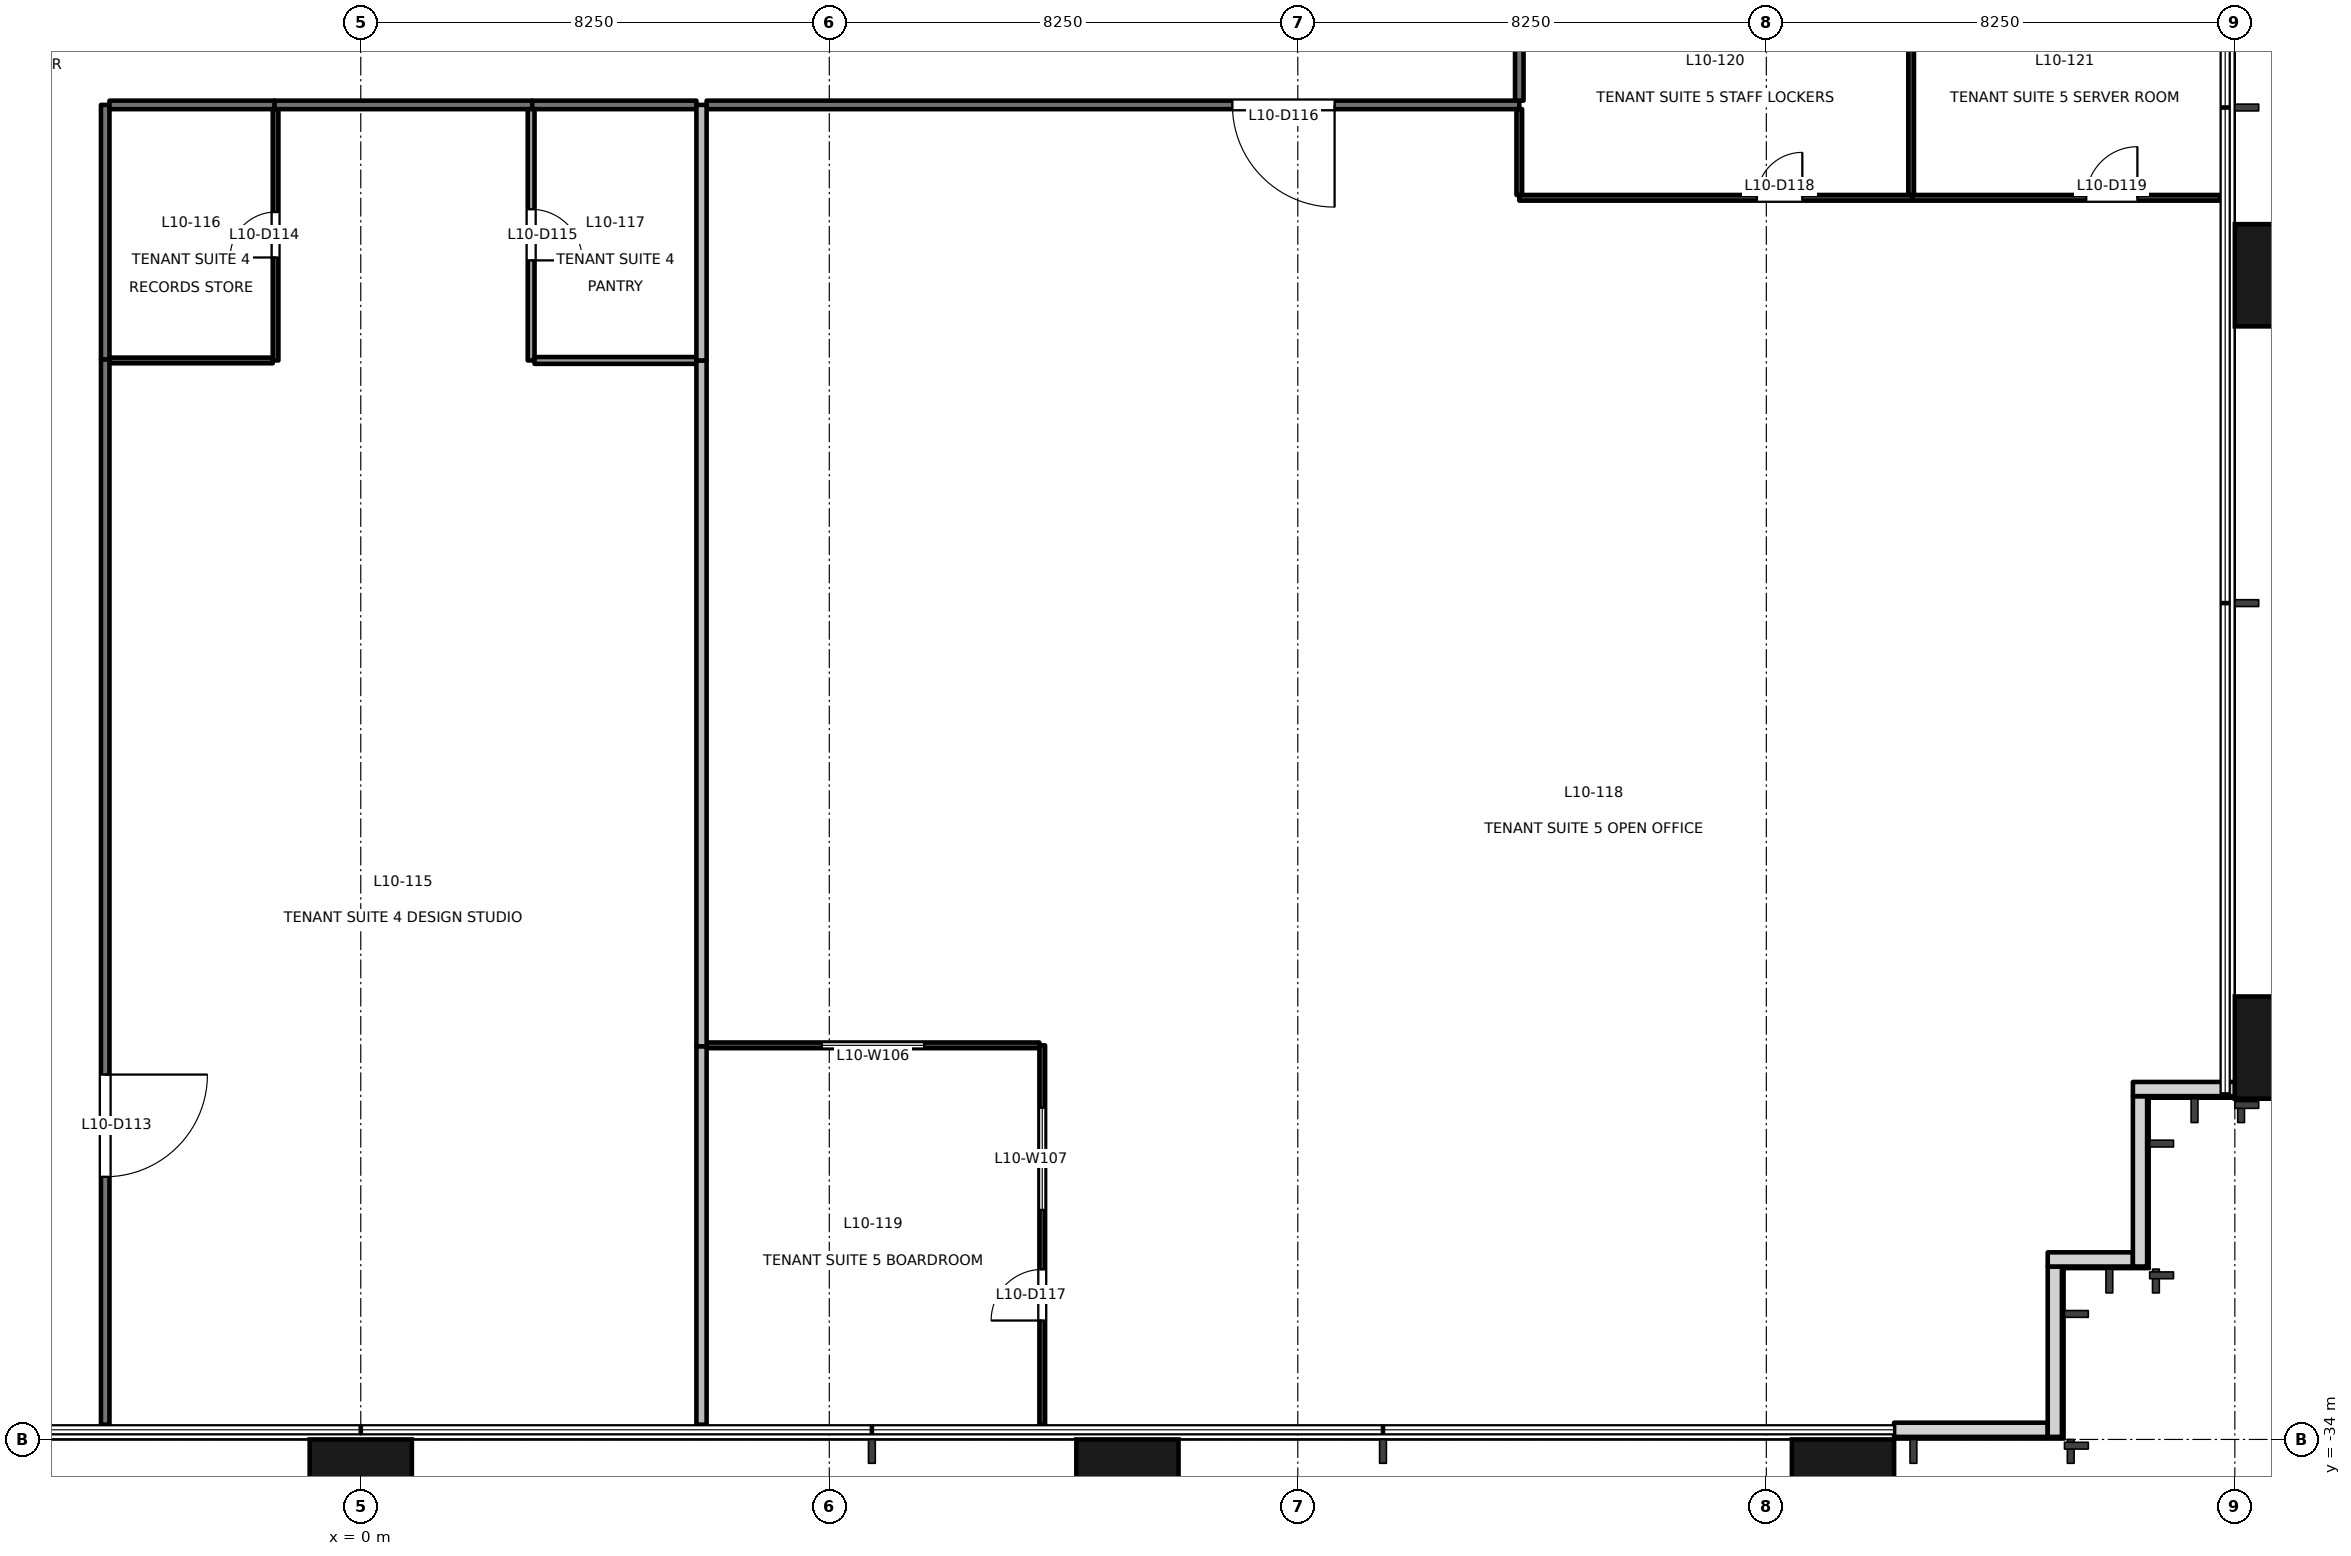
"""IFC4 building model, lengths in metres.
Left out: names, types, materials, properties, quantities, classifications, styles, units other than length and angle.
Written with IfcOpenShell. Run it as: python <this file> out.ifc"""

import sys

from ifc_helpers import new_model, si_unit, direction, frame, frame_2d, origin, origin_2d, place, context, subcontext, project, spatial, rectangle, extrude, element, fill, save


model = new_model("IFC4")
c1 = context("Model", 3, precision=1e-05, world=origin(), true_north=direction((0.0, 1.0)))
c2 = subcontext(c1, "Body", "Model", "MODEL_VIEW")
j1 = project(units=[si_unit("LENGTHUNIT", "METRE"), si_unit("PLANEANGLEUNIT", "RADIAN")], contexts=[c1])
p1 = place(None, origin())
s1 = spatial("IfcSite", under=j1, at=p1, CompositionType="ELEMENT")
p2 = place(p1, origin())
s2 = spatial("IfcBuilding", under=s1, at=p2, CompositionType="ELEMENT")
p3 = place(p2, frame((0.0, 0.0, 48.8)))
s3 = spatial("IfcBuildingStorey", under=s2, at=p3, CompositionType="ELEMENT", Elevation=48.8)
for number, where, z_axis, x_axis in (
    (1, (0.0, -34.9, -0.2), (0.0, 0.0, 1.0), (1.0, 0.0, 0.0)),
    (2, (13.5, -34.9, -0.2), (0.0, 0.0, 1.0), (1.0, 0.0, 0.0)),
    (3, (26.1, -34.9, -0.2), (0.0, 0.0, 1.0), (1.0, 0.0, 0.0)),
    (4, (33.9, -27.1, -0.2), (0.0, 0.0, 1.0), (0.0, 1.0, 0.0)),
    (5, (33.9, -13.5, -0.2), (0.0, 0.0, 1.0), (0.0, 1.0, 0.0)),
):
    element("IfcColumn", number, at=place(p3, frame(where, z_axis=z_axis, x_axis=x_axis)), inside=s3, PredefinedType="COLUMN", context=c2, shape_type="SweptSolid", body=[
        extrude(rectangle(XDim=1.8, YDim=1.8, at=origin_2d()), origin(), (0.0, 0.0, 1.0), 4.1),
    ])
p4 = place(p3, frame((27.0, -33.83, 0.0), z_axis=(0.0, 0.0, 1.0), x_axis=(1.0, 0.0, 0.0)))
e6 = element("IfcWall", 6, at=p4, inside=s3, PredefinedType="SOLIDWALL", context=c2, shape_type="SweptSolid", body=[
    extrude(rectangle(XDim=2.705, YDim=0.25, at=frame_2d((1.353, 0.0))), origin(), (0.0, 0.0, 1.0), 3.9),
])
p5 = place(p3, frame((29.83, -33.955, 0.0), z_axis=(0.0, 0.0, 1.0), x_axis=(0.0, 1.0, 0.0)))
e7 = element("IfcWall", 7, at=p5, inside=s3, PredefinedType="SOLIDWALL", context=c2, shape_type="SweptSolid", body=[
    extrude(rectangle(XDim=3.0, YDim=0.25, at=frame_2d((1.5, 0.0))), origin(), (0.0, 0.0, 1.0), 3.9),
])
p6 = place(p3, frame((29.705, -30.83, 0.0), z_axis=(0.0, 0.0, 1.0), x_axis=(1.0, 0.0, 0.0)))
e8 = element("IfcWall", 8, at=p6, inside=s3, PredefinedType="SOLIDWALL", context=c2, shape_type="SweptSolid", body=[
    extrude(rectangle(XDim=1.5, YDim=0.25, at=frame_2d((0.75, 0.0))), origin(), (0.0, 0.0, 1.0), 3.9),
])
p7 = place(p3, frame((31.33, -30.955, 0.0), z_axis=(0.0, 0.0, 1.0), x_axis=(0.0, 1.0, 0.0)))
e9 = element("IfcWall", 9, at=p7, inside=s3, PredefinedType="SOLIDWALL", context=c2, shape_type="SweptSolid", body=[
    extrude(rectangle(XDim=3.0, YDim=0.25, at=frame_2d((1.5, 0.0))), origin(), (0.0, 0.0, 1.0), 3.9),
])
p8 = place(p3, frame((31.205, -27.83, 0.0), z_axis=(0.0, 0.0, 1.0), x_axis=(1.0, 0.0, 0.0)))
e10 = element("IfcWall", 10, at=p8, inside=s3, PredefinedType="SOLIDWALL", context=c2, shape_type="SweptSolid", body=[
    extrude(rectangle(XDim=1.8, YDim=0.25, at=frame_2d((0.9, 0.0))), origin(), (0.0, 0.0, 1.0), 3.9),
])
p9 = place(p3, frame((-4.5, -14.98, 0.0), z_axis=(0.0, 0.0, 1.0), x_axis=(0.0, -1.0, 0.0)))
e11 = element("IfcWall", 11, at=p9, inside=s3, PredefinedType="PARTITIONING", context=c2, shape_type="SweptSolid", body=[
    extrude(rectangle(XDim=18.76, YDim=0.15, at=frame_2d((9.38, 0.0))), origin(), (0.0, 0.0, 1.0), 2.9),
])
p10 = place(p9, frame((12.595, 0.0, 0.0)))
e12 = element("IfcOpeningElement", 12, at=p10, cuts=e11, PredefinedType="OPENING", context=c2, shape_type="SweptSolid", body=[
    extrude(rectangle(XDim=1.8, YDim=2.1, at=frame_2d((0.9, 1.05))), frame((0.0, 0.085, 0.0), z_axis=(0.0, -1.0, 0.0), x_axis=(1.0, 0.0, 0.0)), (0.0, 0.0, 1.0), 0.171),
])
p11 = place(p3, frame((3.02, -10.5, 0.0), z_axis=(0.0, 0.0, 1.0), x_axis=(-1.0, 0.0, 0.0)))
e13 = element("IfcWall", 13, at=p11, inside=s3, PredefinedType="PARTITIONING", context=c2, shape_type="SweptSolid", body=[
    extrude(rectangle(XDim=4.54, YDim=0.15, at=frame_2d((2.27, 0.0))), origin(), (0.0, 0.0, 1.0), 2.9),
])
p12 = place(p3, frame((-4.5, -10.5, 0.0), z_axis=(0.0, 0.0, 1.0), x_axis=(0.0, -1.0, 0.0)))
e14 = element("IfcWall", 14, at=p12, inside=s3, PredefinedType="PARTITIONING", context=c2, shape_type="SweptSolid", body=[
    extrude(rectangle(XDim=4.48, YDim=0.15, at=frame_2d((2.24, 0.0))), origin(), (0.0, 0.0, 1.0), 2.9),
])
p13 = place(p3, frame((-1.52, -10.5, 0.0), z_axis=(0.0, 0.0, 1.0), x_axis=(-1.0, 0.0, 0.0)))
e15 = element("IfcWall", 15, at=p13, inside=s3, PredefinedType="PARTITIONING", context=c2, shape_type="SweptSolid", body=[
    extrude(rectangle(XDim=2.905, YDim=0.15, at=frame_2d((1.453, 0.0))), origin(), (0.0, 0.0, 1.0), 2.9),
])
p14 = place(p3, frame((5.91, -10.5, 0.0), z_axis=(0.0, 0.0, 1.0), x_axis=(-1.0, 0.0, 0.0)))
e16 = element("IfcWall", 16, at=p14, inside=s3, PredefinedType="PARTITIONING", context=c2, shape_type="SweptSolid", body=[
    extrude(rectangle(XDim=2.89, YDim=0.15, at=frame_2d((1.445, 0.0))), origin(), (0.0, 0.0, 1.0), 2.9),
])
p15 = place(p3, frame((20.4, -10.5, 0.0), z_axis=(0.0, 0.0, 1.0), x_axis=(-1.0, 0.0, 0.0)))
e17 = element("IfcWall", 17, at=p15, inside=s3, PredefinedType="PARTITIONING", context=c2, shape_type="SweptSolid", body=[
    extrude(rectangle(XDim=14.31, YDim=0.15, at=frame_2d((7.155, 0.0))), origin(), (0.0, 0.0, 1.0), 2.5),
])
p16 = place(p15, frame((3.252, 0.0, 0.0)))
e18 = element("IfcOpeningElement", 18, at=p16, cuts=e17, PredefinedType="OPENING", context=c2, shape_type="SweptSolid", body=[
    extrude(rectangle(XDim=1.8, YDim=2.1, at=frame_2d((0.9, 1.05))), frame((0.0, 0.085, 0.0), z_axis=(0.0, -1.0, 0.0), x_axis=(1.0, 0.0, 0.0)), (0.0, 0.0, 1.0), 0.171),
])
p17 = place(p3, frame((20.4, -7.726, 0.0), z_axis=(0.0, 0.0, 1.0), x_axis=(0.0, -1.0, 0.0)))
e19 = element("IfcWall", 19, at=p17, inside=s3, PredefinedType="PARTITIONING", context=c2, shape_type="SweptSolid", body=[
    extrude(rectangle(XDim=2.699, YDim=0.15, at=frame_2d((1.35, 0.0))), origin(), (0.0, 0.0, 1.0), 3.3),
])
p18 = place(p3, frame((-4.425, -15.0, 0.0), z_axis=(0.0, 0.0, 1.0), x_axis=(1.0, 0.0, 0.0)))
e20 = element("IfcWall", 20, at=p18, inside=s3, PredefinedType="PARTITIONING", context=c2, shape_type="SweptSolid", body=[
    extrude(rectangle(XDim=2.875, YDim=0.1, at=frame_2d((1.438, 0.0))), origin(), (0.0, 0.0, 1.0), 2.9),
])
p19 = place(p3, frame((-1.5, -15.0, 0.0), z_axis=(0.0, 0.0, 1.0), x_axis=(0.0, 1.0, 0.0)))
e21 = element("IfcWall", 21, at=p19, inside=s3, PredefinedType="PARTITIONING", context=c2, shape_type="SweptSolid", body=[
    extrude(rectangle(XDim=4.425, YDim=0.1, at=frame_2d((2.212, 0.0))), origin(), (0.0, 0.0, 1.0), 3.9),
])
p20 = place(p19, frame((1.813, 0.0, 0.0)))
e22 = element("IfcOpeningElement", 22, at=p20, cuts=e21, PredefinedType="OPENING", context=c2, shape_type="SweptSolid", body=[
    extrude(rectangle(XDim=0.8, YDim=2.1, at=frame_2d((0.4, 1.05))), frame((0.0, 0.061, 0.0), z_axis=(0.0, -1.0, 0.0), x_axis=(1.0, 0.0, 0.0)), (0.0, 0.0, 1.0), 0.121),
])
p21 = place(p3, frame((3.0, -10.575, 0.0), z_axis=(0.0, 0.0, 1.0), x_axis=(0.0, -1.0, 0.0)))
e23 = element("IfcWall", 23, at=p21, inside=s3, PredefinedType="PARTITIONING", context=c2, shape_type="SweptSolid", body=[
    extrude(rectangle(XDim=4.425, YDim=0.12, at=frame_2d((2.212, 0.0))), origin(), (0.0, 0.0, 1.0), 3.9),
])
p22 = place(p21, frame((1.763, 0.0, 0.0)))
e24 = element("IfcOpeningElement", 24, at=p22, cuts=e23, PredefinedType="OPENING", context=c2, shape_type="SweptSolid", body=[
    extrude(rectangle(XDim=0.9, YDim=2.1, at=frame_2d((0.45, 1.05))), frame((0.0, 0.071, 0.0), z_axis=(0.0, -1.0, 0.0), x_axis=(1.0, 0.0, 0.0)), (0.0, 0.0, 1.0), 0.141),
])
p23 = place(p3, frame((3.06, -15.0, 0.0), z_axis=(0.0, 0.0, 1.0), x_axis=(1.0, 0.0, 0.0)))
e25 = element("IfcWall", 25, at=p23, inside=s3, PredefinedType="PARTITIONING", context=c2, shape_type="SweptSolid", body=[
    extrude(rectangle(XDim=2.85, YDim=0.12, at=frame_2d((1.425, 0.0))), origin(), (0.0, 0.0, 1.0), 2.9),
])
p24 = place(p3, frame((6.0, -15.0, 0.0), z_axis=(0.0, 0.0, 1.0), x_axis=(0.0, -1.0, 0.0)))
e26 = element("IfcWall", 26, at=p24, inside=s3, PredefinedType="PARTITIONING", context=c2, shape_type="SweptSolid", body=[
    extrude(rectangle(XDim=12.08, YDim=0.18, at=frame_2d((6.04, 0.0))), origin(), (0.0, 0.0, 1.0), 3.9),
])
p25 = place(p3, frame((6.0, -27.08, 0.0), z_axis=(0.0, 0.0, 1.0), x_axis=(0.0, -1.0, 0.0)))
e27 = element("IfcWall", 27, at=p25, inside=s3, PredefinedType="PARTITIONING", context=c2, shape_type="SweptSolid", body=[
    extrude(rectangle(XDim=6.66, YDim=0.18, at=frame_2d((3.33, 0.0))), origin(), (0.0, 0.0, 1.0), 3.9),
])
p26 = place(p3, frame((6.0, -10.5, 0.0), z_axis=(0.0, 0.0, 1.0), x_axis=(0.0, -1.0, 0.0)))
e28 = element("IfcWall", 28, at=p26, inside=s3, PredefinedType="PARTITIONING", context=c2, shape_type="SweptSolid", body=[
    extrude(rectangle(XDim=4.5, YDim=0.18, at=frame_2d((2.25, 0.0))), origin(), (0.0, 0.0, 1.0), 3.9),
])
p27 = place(p3, frame((11.95, -27.06, 0.0), z_axis=(0.0, 0.0, 1.0), x_axis=(-1.0, 0.0, 0.0)))
e29 = element("IfcWall", 29, at=p27, inside=s3, PredefinedType="PARTITIONING", context=c2, shape_type="SweptSolid", body=[
    extrude(rectangle(XDim=5.86, YDim=0.1, at=frame_2d((2.93, 0.0))), origin(), (0.0, 0.0, 1.0), 2.9),
])
p28 = place(p27, frame((2.03, 0.0, 0.9)))
e30 = element("IfcOpeningElement", 30, at=p28, cuts=e29, PredefinedType="OPENING", context=c2, shape_type="SweptSolid", body=[
    extrude(rectangle(XDim=1.8, YDim=1.2, at=frame_2d((0.9, 0.6))), frame((0.0, 0.061, 0.0), z_axis=(0.0, -1.0, 0.0), x_axis=(1.0, 0.0, 0.0)), (0.0, 0.0, 1.0), 0.121),
])
p29 = place(p3, frame((12.0, -33.74, 0.0), z_axis=(0.0, 0.0, 1.0), x_axis=(0.0, 1.0, 0.0)))
e31 = element("IfcWall", 31, at=p29, inside=s3, PredefinedType="PARTITIONING", context=c2, shape_type="SweptSolid", body=[
    extrude(rectangle(XDim=6.68, YDim=0.1, at=frame_2d((3.34, 0.0))), origin(), (0.0, 0.0, 1.0), 3.9),
])
p30 = place(p29, frame((1.834, 0.0, 0.0)))
e32 = element("IfcOpeningElement", 32, at=p30, cuts=e31, PredefinedType="OPENING", context=c2, shape_type="SweptSolid", body=[
    extrude(rectangle(XDim=0.9, YDim=2.1, at=frame_2d((0.45, 1.05))), frame((0.0, 0.061, 0.0), z_axis=(0.0, -1.0, 0.0), x_axis=(1.0, 0.0, 0.0)), (0.0, 0.0, 1.0), 0.121),
])
p31 = place(p29, frame((3.782, 0.0, 0.9)))
e33 = element("IfcOpeningElement", 33, at=p31, cuts=e31, PredefinedType="OPENING", context=c2, shape_type="SweptSolid", body=[
    extrude(rectangle(XDim=1.8, YDim=1.2, at=frame_2d((0.9, 0.6))), frame((0.0, 0.061, 0.0), z_axis=(0.0, -1.0, 0.0), x_axis=(1.0, 0.0, 0.0)), (0.0, 0.0, 1.0), 0.121),
])
p32 = place(p3, frame((20.4, -12.136, 0.0), z_axis=(0.0, 0.0, 1.0), x_axis=(1.0, 0.0, 0.0)))
e34 = element("IfcWall", 34, at=p32, inside=s3, PredefinedType="PARTITIONING", context=c2, shape_type="SweptSolid", body=[
    extrude(rectangle(XDim=6.92, YDim=0.1, at=frame_2d((3.46, 0.0))), origin(), (0.0, 0.0, 1.0), 3.9),
])
p33 = place(p32, frame((4.184, 0.0, 0.0)))
e35 = element("IfcOpeningElement", 35, at=p33, cuts=e34, PredefinedType="OPENING", context=c2, shape_type="SweptSolid", body=[
    extrude(rectangle(XDim=0.8, YDim=2.1, at=frame_2d((0.4, 1.05))), frame((0.0, 0.061, 0.0), z_axis=(0.0, -1.0, 0.0), x_axis=(1.0, 0.0, 0.0)), (0.0, 0.0, 1.0), 0.121),
])
p34 = place(p3, frame((20.4, -10.575, 0.0), z_axis=(0.0, 0.0, 1.0), x_axis=(0.0, -1.0, 0.0)))
e36 = element("IfcWall", 36, at=p34, inside=s3, PredefinedType="PARTITIONING", context=c2, shape_type="SweptSolid", body=[
    extrude(rectangle(XDim=1.511, YDim=0.1, at=frame_2d((0.755, 0.0))), origin(), (0.0, 0.0, 1.0), 3.9),
])
p35 = place(p3, frame((27.32, -12.136, 0.0), z_axis=(0.0, 0.0, 1.0), x_axis=(1.0, 0.0, 0.0)))
e37 = element("IfcWall", 37, at=p35, inside=s3, PredefinedType="PARTITIONING", context=c2, shape_type="SweptSolid", body=[
    extrude(rectangle(XDim=5.42, YDim=0.1, at=frame_2d((2.71, 0.0))), origin(), (0.0, 0.0, 1.0), 3.9),
])
p36 = place(p35, frame((3.064, 0.0, 0.0)))
e38 = element("IfcOpeningElement", 38, at=p36, cuts=e37, PredefinedType="OPENING", context=c2, shape_type="SweptSolid", body=[
    extrude(rectangle(XDim=0.9, YDim=2.1, at=frame_2d((0.45, 1.05))), frame((0.0, 0.061, 0.0), z_axis=(0.0, -1.0, 0.0), x_axis=(1.0, 0.0, 0.0)), (0.0, 0.0, 1.0), 0.121),
])
p37 = place(p3, frame((27.3, -7.726, 0.0), z_axis=(0.0, 0.0, 1.0), x_axis=(0.0, -1.0, 0.0)))
e39 = element("IfcWall", 39, at=p37, inside=s3, PredefinedType="PARTITIONING", context=c2, shape_type="SweptSolid", body=[
    extrude(rectangle(XDim=4.36, YDim=0.1, at=frame_2d((2.18, 0.0))), origin(), (0.0, 0.0, 1.0), 3.3),
])
p38 = place(p10, origin())
e40 = element("IfcDoor", 40, at=p38, inside=s3, OperationType="DOUBLE_DOOR_SINGLE_SWING", PredefinedType="DOOR", context=c2, shape_type="SweptSolid", body=[
    extrude(rectangle(XDim=1.8, YDim=2.1, at=frame_2d((0.9, 1.05))), frame((0.0, 0.025, 0.0), z_axis=(0.0, -1.0, 0.0), x_axis=(1.0, 0.0, 0.0)), (0.0, 0.0, 1.0), 0.05),
])
fill(e12, e40)
p39 = place(p20, origin())
e41 = element("IfcDoor", 41, at=p39, inside=s3, OperationType="SINGLE_SWING_LEFT", PredefinedType="DOOR", context=c2, shape_type="SweptSolid", body=[
    extrude(rectangle(XDim=0.8, YDim=2.1, at=frame_2d((0.4, 1.05))), frame((0.0, 0.025, 0.0), z_axis=(0.0, -1.0, 0.0), x_axis=(1.0, 0.0, 0.0)), (0.0, 0.0, 1.0), 0.05),
])
fill(e22, e41)
p40 = place(p22, origin())
e42 = element("IfcDoor", 42, at=p40, inside=s3, OperationType="SINGLE_SWING_RIGHT", PredefinedType="DOOR", context=c2, shape_type="SweptSolid", body=[
    extrude(rectangle(XDim=0.9, YDim=2.1, at=frame_2d((0.45, 1.05))), frame((0.0, 0.025, 0.0), z_axis=(0.0, -1.0, 0.0), x_axis=(1.0, 0.0, 0.0)), (0.0, 0.0, 1.0), 0.05),
])
fill(e24, e42)
p41 = place(p16, origin())
e43 = element("IfcDoor", 43, at=p41, inside=s3, OperationType="DOUBLE_DOOR_SINGLE_SWING", PredefinedType="DOOR", context=c2, shape_type="SweptSolid", body=[
    extrude(rectangle(XDim=1.8, YDim=2.1, at=frame_2d((0.9, 1.05))), frame((0.0, 0.025, 0.0), z_axis=(0.0, -1.0, 0.0), x_axis=(1.0, 0.0, 0.0)), (0.0, 0.0, 1.0), 0.05),
])
fill(e18, e43)
p42 = place(p30, origin())
e44 = element("IfcDoor", 44, at=p42, inside=s3, OperationType="SINGLE_SWING_LEFT", PredefinedType="DOOR", context=c2, shape_type="SweptSolid", body=[
    extrude(rectangle(XDim=0.9, YDim=2.1, at=frame_2d((0.45, 1.05))), frame((0.0, 0.025, 0.0), z_axis=(0.0, -1.0, 0.0), x_axis=(1.0, 0.0, 0.0)), (0.0, 0.0, 1.0), 0.05),
])
fill(e32, e44)
p43 = place(p33, origin())
e45 = element("IfcDoor", 45, at=p43, inside=s3, OperationType="SINGLE_SWING_RIGHT", PredefinedType="DOOR", context=c2, shape_type="SweptSolid", body=[
    extrude(rectangle(XDim=0.8, YDim=2.1, at=frame_2d((0.4, 1.05))), frame((0.0, 0.025, 0.0), z_axis=(0.0, -1.0, 0.0), x_axis=(1.0, 0.0, 0.0)), (0.0, 0.0, 1.0), 0.05),
])
fill(e35, e45)
p44 = place(p36, origin())
e46 = element("IfcDoor", 46, at=p44, inside=s3, OperationType="SINGLE_SWING_RIGHT", PredefinedType="DOOR", context=c2, shape_type="SweptSolid", body=[
    extrude(rectangle(XDim=0.9, YDim=2.1, at=frame_2d((0.45, 1.05))), frame((0.0, 0.025, 0.0), z_axis=(0.0, -1.0, 0.0), x_axis=(1.0, 0.0, 0.0)), (0.0, 0.0, 1.0), 0.05),
])
fill(e38, e46)
p45 = place(p28, origin())
e47 = element("IfcWindow", 47, at=p45, inside=s3, PartitioningType="SINGLE_PANEL", PredefinedType="WINDOW", context=c2, shape_type="SweptSolid", body=[
    extrude(rectangle(XDim=1.8, YDim=1.2, at=frame_2d((0.9, 0.6))), frame((0.0, 0.03, 0.0), z_axis=(0.0, -1.0, 0.0), x_axis=(1.0, 0.0, 0.0)), (0.0, 0.0, 1.0), 0.06),
])
fill(e30, e47)
p46 = place(p31, origin())
e48 = element("IfcWindow", 48, at=p46, inside=s3, PartitioningType="SINGLE_PANEL", PredefinedType="WINDOW", context=c2, shape_type="SweptSolid", body=[
    extrude(rectangle(XDim=1.8, YDim=1.2, at=frame_2d((0.9, 0.6))), frame((0.0, 0.03, 0.0), z_axis=(0.0, -1.0, 0.0), x_axis=(1.0, 0.0, 0.0)), (0.0, 0.0, 1.0), 0.06),
])
fill(e33, e48)
save(model, sys.argv[1])
